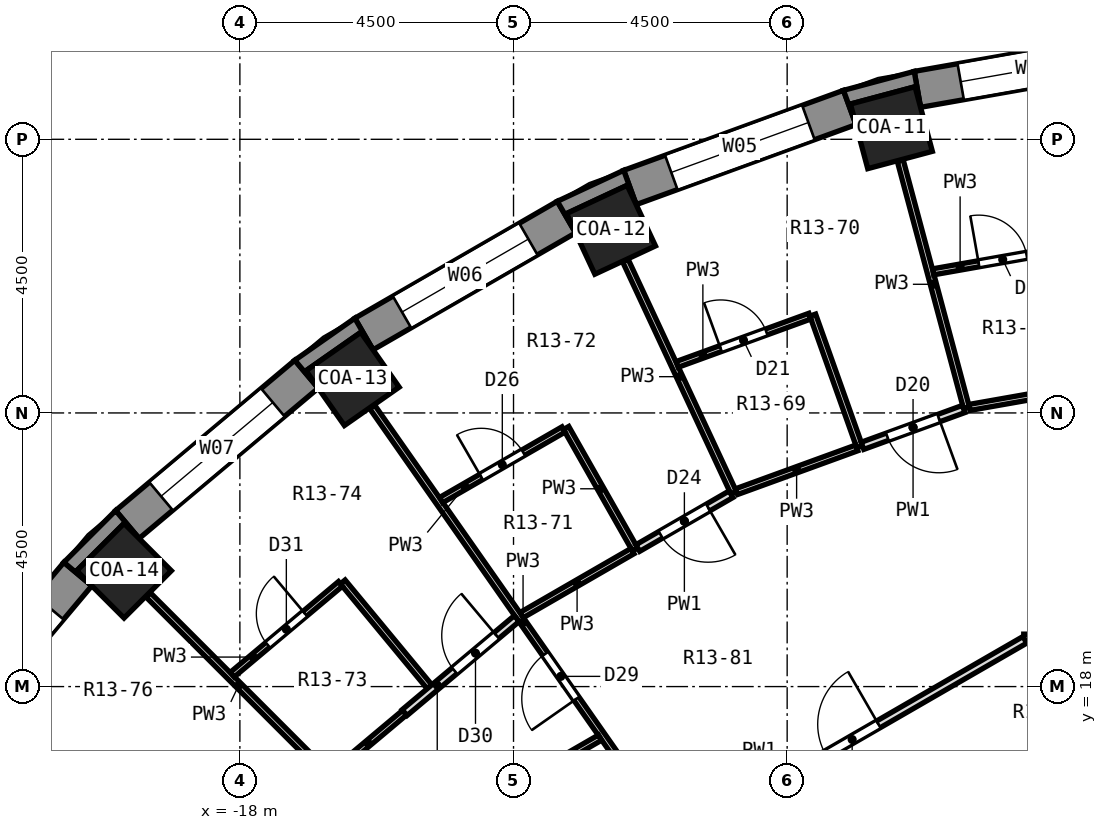
"""IFC4 building model, lengths in metres.
Left out: names, types, materials, properties, quantities, classifications, styles, units other than length and angle.
Written with IfcOpenShell. Run it as: python <this file> out.ifc"""

import sys

from ifc_helpers import new_model, si_unit, direction, frame, frame_2d, origin, origin_2d, place, context, subcontext, project, spatial, polyline, rectangle, outline, extrude, element, fill, save


model = new_model("IFC4")
c1 = context("Model", 3, precision=1e-05, world=origin(), true_north=direction((0.0, 1.0)))
c2 = subcontext(c1, "Body", "Model", "MODEL_VIEW")
j1 = project(units=[si_unit("LENGTHUNIT", "METRE"), si_unit("PLANEANGLEUNIT", "RADIAN")], contexts=[c1])
p1 = place(None, origin())
s1 = spatial("IfcSite", under=j1, at=p1, CompositionType="ELEMENT")
p2 = place(p1, origin())
s2 = spatial("IfcBuilding", under=s1, at=p2, CompositionType="ELEMENT")
p3 = place(p2, frame((0.0, 0.0, 65.9)))
s3 = spatial("IfcBuildingStorey", under=s2, at=p3, CompositionType="ELEMENT", Elevation=65.9)
for number, where, z_axis, x_axis in (
    (1, (-7.286, 27.191, 0.0), (0.0, 0.0, 1.0), (-0.259, 0.966, 0.0)),
    (2, (-11.897, 25.512, 0.0), (0.0, 0.0, 1.0), (-0.423, 0.906, 0.0)),
    (3, (-16.146, 23.059, 0.0), (0.0, 0.0, 1.0), (-0.574, 0.819, 0.0)),
    (4, (-19.905, 19.905, 0.0), (0.0, 0.0, 1.0), (-0.707, 0.707, 0.0)),
):
    element("IfcColumn", number, at=place(p3, frame(where, z_axis=z_axis, x_axis=x_axis)), inside=s3, PredefinedType="COLUMN", context=c2, shape_type="SweptSolid", body=[
        extrude(rectangle(XDim=1.1, YDim=1.1, at=origin_2d()), origin(), (0.0, 0.0, 1.0), 3.3),
    ])
p4 = place(p3, frame((-3.071, 28.489, 0.0), z_axis=(0.0, 0.0, 1.0), x_axis=(-0.984800809218, -0.173687553279, 0.0)))
e5 = element("IfcWall", 5, at=p4, inside=s3, PredefinedType="SOLIDWALL", context=c2, shape_type="SweptSolid", body=[
    extrude(rectangle(XDim=3.846, YDim=0.6, at=frame_2d((1.923, 0.0))), origin(), (0.0, 0.0, 1.0), 2.75),
])
p5 = place(p4, frame((0.723, 0.0, 0.9)))
e6 = element("IfcOpeningElement", 6, at=p5, cuts=e5, PredefinedType="OPENING", context=c2, shape_type="SweptSolid", body=[
    extrude(rectangle(XDim=2.4, YDim=1.8, at=frame_2d((1.2, 0.9))), frame((0.0, 0.312, 0.0), z_axis=(0.0, -1.0, 0.0), x_axis=(1.0, 0.0, 0.0)), (0.0, 0.0, 1.0), 0.624),
])
p6 = place(p3, frame((-7.971, 27.523, 0.0), z_axis=(0.0, 0.0, 1.0), x_axis=(-0.939689588564, -0.342028474173, 0.0)))
e7 = element("IfcWall", 7, at=p6, inside=s3, PredefinedType="SOLIDWALL", context=c2, shape_type="SweptSolid", body=[
    extrude(rectangle(XDim=3.846, YDim=0.6, at=frame_2d((1.923, 0.0))), origin(), (0.0, 0.0, 1.0), 2.75),
])
p7 = place(p6, frame((0.723, 0.0, 0.9)))
e8 = element("IfcOpeningElement", 8, at=p7, cuts=e7, PredefinedType="OPENING", context=c2, shape_type="SweptSolid", body=[
    extrude(rectangle(XDim=2.4, YDim=1.8, at=frame_2d((1.2, 0.9))), frame((0.0, 0.312, 0.0), z_axis=(0.0, -1.0, 0.0), x_axis=(1.0, 0.0, 0.0)), (0.0, 0.0, 1.0), 0.624),
])
p8 = place(p3, frame((-12.63, 25.721, 0.0), z_axis=(0.0, 0.0, 1.0), x_axis=(-0.86603124159, -0.499989888488, 0.0)))
e9 = element("IfcWall", 9, at=p8, inside=s3, PredefinedType="SOLIDWALL", context=c2, shape_type="SweptSolid", body=[
    extrude(rectangle(XDim=3.846, YDim=0.6, at=frame_2d((1.923, 0.0))), origin(), (0.0, 0.0, 1.0), 2.75),
])
p9 = place(p8, frame((0.723, 0.0, 0.9)))
e10 = element("IfcOpeningElement", 10, at=p9, cuts=e9, PredefinedType="OPENING", context=c2, shape_type="SweptSolid", body=[
    extrude(rectangle(XDim=2.4, YDim=1.8, at=frame_2d((1.2, 0.9))), frame((0.0, 0.312, 0.0), z_axis=(0.0, -1.0, 0.0), x_axis=(1.0, 0.0, 0.0)), (0.0, 0.0, 1.0), 0.624),
])
p10 = place(p3, frame((-16.904, 23.137, 0.0), z_axis=(0.0, 0.0, 1.0), x_axis=(-0.766026164483, -0.642809392687, 0.0)))
e11 = element("IfcWall", 11, at=p10, inside=s3, PredefinedType="SOLIDWALL", context=c2, shape_type="SweptSolid", body=[
    extrude(rectangle(XDim=3.846, YDim=0.6, at=frame_2d((1.923, 0.0))), origin(), (0.0, 0.0, 1.0), 2.75),
])
p11 = place(p10, frame((0.723, 0.0, 0.9)))
e12 = element("IfcOpeningElement", 12, at=p11, cuts=e11, PredefinedType="OPENING", context=c2, shape_type="SweptSolid", body=[
    extrude(rectangle(XDim=2.4, YDim=1.8, at=frame_2d((1.2, 0.9))), frame((0.0, 0.312, 0.0), z_axis=(0.0, -1.0, 0.0), x_axis=(1.0, 0.0, 0.0)), (0.0, 0.0, 1.0), 0.624),
])
p12 = place(p3, frame((-20.665, 19.85, 0.0), z_axis=(0.0, 0.0, 1.0), x_axis=(-0.642809392687, -0.766026164483, 0.0)))
e13 = element("IfcWall", 13, at=p12, inside=s3, PredefinedType="SOLIDWALL", context=c2, shape_type="SweptSolid", body=[
    extrude(rectangle(XDim=3.846, YDim=0.6, at=frame_2d((1.923, 0.0))), origin(), (0.0, 0.0, 1.0), 2.75),
])
p13 = place(p12, frame((0.723, 0.0, 0.9)))
e14 = element("IfcOpeningElement", 14, at=p13, cuts=e13, PredefinedType="OPENING", context=c2, shape_type="SweptSolid", body=[
    extrude(rectangle(XDim=2.4, YDim=1.8, at=frame_2d((1.2, 0.9))), frame((0.0, 0.312, 0.0), z_axis=(0.0, -1.0, 0.0), x_axis=(1.0, 0.0, 0.0)), (0.0, 0.0, 1.0), 0.624),
])
p14 = place(p3, origin())
e15 = element("IfcWall", 15, at=p14, inside=s3, PredefinedType="SOLIDWALL", context=c2, shape_type="SweptSolid", body=[
    extrude(outline(polyline([(-6.91, 28.117), (-8.074, 27.805), (-7.869, 27.241), (-7.959, 27.58), (-6.897, 27.865), (-6.806, 27.526), (-6.91, 28.117)])), origin(), (0.0, 0.0, 1.0), 2.75),
])
p15 = place(p3, origin())
e16 = element("IfcWall", 16, at=p15, inside=s3, PredefinedType="SOLIDWALL", context=c2, shape_type="SweptSolid", body=[
    extrude(outline(polyline([(-12.78, 25.981), (-12.479, 25.461), (-12.628, 25.779), (-11.631, 26.243), (-11.483, 25.926), (-11.688, 26.49), (-12.78, 25.981)])), origin(), (0.0, 0.0, 1.0), 2.75),
])
p16 = place(p3, origin())
e17 = element("IfcWall", 17, at=p16, inside=s3, PredefinedType="SOLIDWALL", context=c2, shape_type="SweptSolid", body=[
    extrude(outline(polyline([(-16.11, 24.058), (-17.097, 23.367), (-16.711, 22.907), (-16.912, 23.194), (-16.011, 23.825), (-15.81, 23.538), (-16.11, 24.058)])), origin(), (0.0, 0.0, 1.0), 2.75),
])
p17 = place(p3, origin())
e18 = element("IfcWall", 18, at=p17, inside=s3, PredefinedType="SOLIDWALL", context=c2, shape_type="SweptSolid", body=[
    extrude(outline(polyline([(-20.895, 20.043), (-20.435, 19.657), (-20.683, 19.905), (-19.905, 20.683), (-19.657, 20.435), (-20.043, 20.895), (-20.895, 20.043)])), origin(), (0.0, 0.0, 1.0), 2.75),
])
p18 = place(p3, frame((-7.14, 26.65, 0.0), z_axis=(0.0, 0.0, 1.0), x_axis=(0.258611481132, -0.965981418986, 0.0)))
e19 = element("IfcWall", 19, at=p18, inside=s3, PredefinedType="PARTITIONING", context=c2, shape_type="SweptSolid", body=[
    extrude(rectangle(XDim=4.211, YDim=0.1, at=frame_2d((2.106, 0.0))), origin(), (0.0, 0.0, 1.0), 2.75),
])
p19 = place(p3, frame((-8.579, 24.109, 0.0), z_axis=(0.0, 0.0, 1.0), x_axis=(0.335206501266, -0.942144681835, 0.0)))
e20 = element("IfcWall", 20, at=p19, inside=s3, PredefinedType="PARTITIONING", context=c2, shape_type="SweptSolid", body=[
    extrude(rectangle(XDim=2.3, YDim=0.1, at=frame_2d((1.15, 0.0))), origin(), (0.0, 0.0, 1.0), 2.75),
])
p20 = place(p3, frame((-11.66, 25.005, 0.0), z_axis=(0.0, 0.0, 1.0), x_axis=(0.422631582156, -0.906301575506, 0.0)))
e21 = element("IfcWall", 21, at=p20, inside=s3, PredefinedType="PARTITIONING", context=c2, shape_type="SweptSolid", body=[
    extrude(rectangle(XDim=4.212, YDim=0.1, at=frame_2d((2.106, 0.0))), origin(), (0.0, 0.0, 1.0), 2.75),
])
p21 = place(p3, frame((-12.635, 22.253, 0.0), z_axis=(0.0, 0.0, 1.0), x_axis=(0.493564284385, -0.869709317634, 0.0)))
e22 = element("IfcWall", 22, at=p21, inside=s3, PredefinedType="PARTITIONING", context=c2, shape_type="SweptSolid", body=[
    extrude(rectangle(XDim=2.3, YDim=0.1, at=frame_2d((1.15, 0.0))), origin(), (0.0, 0.0, 1.0), 2.75),
])
p22 = place(p3, frame((-15.825, 22.601, 0.0), z_axis=(0.0, 0.0, 1.0), x_axis=(0.57339608395, -0.819278298816, 0.0)))
e23 = element("IfcWall", 23, at=p22, inside=s3, PredefinedType="PARTITIONING", context=c2, shape_type="SweptSolid", body=[
    extrude(rectangle(XDim=8.655, YDim=0.1, at=frame_2d((4.328, 0.0))), origin(), (0.0, 0.0, 1.0), 2.75),
])
p23 = place(p22, frame((7.264, 0.0, 0.0)))
e24 = element("IfcOpeningElement", 24, at=p23, cuts=e23, PredefinedType="OPENING", context=c2, shape_type="SweptSolid", body=[
    extrude(rectangle(XDim=0.8, YDim=2.1, at=frame_2d((0.4, 1.05))), frame((0.0, 0.062, 0.0), z_axis=(0.0, -1.0, 0.0), x_axis=(1.0, 0.0, 0.0)), (0.0, 0.0, 1.0), 0.124),
])
p24 = place(p22, frame((4.96, 0.0, 0.0)))
e25 = element("IfcOpeningElement", 25, at=p24, cuts=e23, PredefinedType="OPENING", context=c2, shape_type="SweptSolid", body=[
    extrude(rectangle(XDim=0.9, YDim=2.1, at=frame_2d((0.45, 1.05))), frame((0.0, 0.062, 0.0), z_axis=(0.0, -1.0, 0.0), x_axis=(1.0, 0.0, 0.0)), (0.0, 0.0, 1.0), 0.124),
])
p25 = place(p3, frame((-16.308, 19.721, 0.0), z_axis=(0.0, 0.0, 1.0), x_axis=(0.637464982276, -0.770479328971, 0.0)))
e26 = element("IfcWall", 26, at=p25, inside=s3, PredefinedType="PARTITIONING", context=c2, shape_type="SweptSolid", body=[
    extrude(rectangle(XDim=2.237, YDim=0.1, at=frame_2d((1.119, 0.0))), origin(), (0.0, 0.0, 1.0), 2.75),
])
p26 = place(p3, frame((-19.509, 19.509, 0.0), z_axis=(0.0, 0.0, 1.0), x_axis=(0.707106781187, -0.707106781187, 0.0)))
e27 = element("IfcWall", 27, at=p26, inside=s3, PredefinedType="PARTITIONING", context=c2, shape_type="SweptSolid", body=[
    extrude(rectangle(XDim=4.212, YDim=0.1, at=frame_2d((2.106, 0.0))), origin(), (0.0, 0.0, 1.0), 2.75),
])
p27 = place(p3, frame((-5.109, 18.8, 0.0), z_axis=(0.0, 0.0, 1.0), x_axis=(1.0, 0.0, 0.0)))
e28 = element("IfcWall", 28, at=p27, inside=s3, PredefinedType="PARTITIONING", context=c2, shape_type="SweptSolid", body=[
    extrude(rectangle(XDim=10.084, YDim=0.125, at=frame_2d((5.042, 0.0))), origin(), (0.0, 0.0, 1.0), 2.75),
])
p28 = place(p3, frame((-6.002, 22.591, 0.0), z_axis=(0.0, 0.0, 1.0), x_axis=(0.984798730273, 0.173699340392, 0.0)))
e29 = element("IfcWall", 29, at=p28, inside=s3, PredefinedType="PARTITIONING", context=c2, shape_type="SweptSolid", body=[
    extrude(rectangle(XDim=2.105, YDim=0.1, at=frame_2d((1.053, 0.0))), origin(), (0.0, 0.0, 1.0), 2.75),
])
p29 = place(p3, frame((-6.599, 24.821, 0.0), z_axis=(0.0, 0.0, 1.0), x_axis=(0.984793079882, 0.173731372577, 0.0)))
e30 = element("IfcWall", 30, at=p29, inside=s3, PredefinedType="PARTITIONING", context=c2, shape_type="SweptSolid", body=[
    extrude(rectangle(XDim=2.323, YDim=0.1, at=frame_2d((1.162, 0.0))), origin(), (0.0, 0.0, 1.0), 2.75),
])
p30 = place(p29, frame((0.761, 0.0, 0.0)))
e31 = element("IfcOpeningElement", 31, at=p30, cuts=e30, PredefinedType="OPENING", context=c2, shape_type="SweptSolid", body=[
    extrude(rectangle(XDim=0.8, YDim=2.1, at=frame_2d((0.4, 1.05))), frame((0.0, 0.062, 0.0), z_axis=(0.0, -1.0, 0.0), x_axis=(1.0, 0.0, 0.0)), (0.0, 0.0, 1.0), 0.124),
])
p31 = place(p3, frame((-9.833, 21.205, 0.0), z_axis=(0.0, 0.0, 1.0), x_axis=(0.939725675468, 0.341929312674, 0.0)))
e32 = element("IfcWall", 32, at=p31, inside=s3, PredefinedType="PARTITIONING", context=c2, shape_type="SweptSolid", body=[
    extrude(rectangle(XDim=2.105, YDim=0.1, at=frame_2d((1.052, 0.0))), origin(), (0.0, 0.0, 1.0), 2.75),
])
p32 = place(p3, frame((-7.761, 21.959, 0.0), z_axis=(0.0, 0.0, 1.0), x_axis=(0.939620127684, 0.342219250849, 0.0)))
e33 = element("IfcWall", 33, at=p32, inside=s3, PredefinedType="PARTITIONING", context=c2, shape_type="SweptSolid", body=[
    extrude(rectangle(XDim=1.77, YDim=0.125, at=frame_2d((0.885, 0.0))), origin(), (0.0, 0.0, 1.0), 2.75),
])
p33 = place(p32, frame((0.435, 0.0, 0.0)))
e34 = element("IfcOpeningElement", 34, at=p33, cuts=e33, PredefinedType="OPENING", context=c2, shape_type="SweptSolid", body=[
    extrude(rectangle(XDim=0.9, YDim=2.1, at=frame_2d((0.45, 1.05))), frame((0.0, 0.074, 0.0), z_axis=(0.0, -1.0, 0.0), x_axis=(1.0, 0.0, 0.0)), (0.0, 0.0, 1.0), 0.149),
])
p34 = place(p3, frame((-10.809, 23.298, 0.0), z_axis=(0.0, 0.0, 1.0), x_axis=(0.939802630001, 0.341717744115, 0.0)))
e35 = element("IfcWall", 35, at=p34, inside=s3, PredefinedType="PARTITIONING", context=c2, shape_type="SweptSolid", body=[
    extrude(rectangle(XDim=2.323, YDim=0.1, at=frame_2d((1.161, 0.0))), origin(), (0.0, 0.0, 1.0), 2.75),
])
p35 = place(p34, frame((0.761, 0.0, 0.0)))
e36 = element("IfcOpeningElement", 36, at=p35, cuts=e35, PredefinedType="OPENING", context=c2, shape_type="SweptSolid", body=[
    extrude(rectangle(XDim=0.8, YDim=2.1, at=frame_2d((0.4, 1.05))), frame((0.0, 0.062, 0.0), z_axis=(0.0, -1.0, 0.0), x_axis=(1.0, 0.0, 0.0)), (0.0, 0.0, 1.0), 0.124),
])
p36 = place(p3, frame((-13.825, 13.727, 0.0), z_axis=(0.0, 0.0, 1.0), x_axis=(0.866059817553, 0.499940388867, 0.0)))
e37 = element("IfcWall", 37, at=p36, inside=s3, PredefinedType="PARTITIONING", context=c2, shape_type="SweptSolid", body=[
    extrude(rectangle(XDim=10.085, YDim=0.125, at=frame_2d((5.042, 0.0))), origin(), (0.0, 0.0, 1.0), 2.75),
])
p37 = place(p36, frame((6.306, 0.0, 0.0)))
e38 = element("IfcOpeningElement", 38, at=p37, cuts=e37, PredefinedType="OPENING", context=c2, shape_type="SweptSolid", body=[
    extrude(rectangle(XDim=1.0, YDim=2.1, at=frame_2d((0.5, 1.05))), frame((0.0, 0.074, 0.0), z_axis=(0.0, -1.0, 0.0), x_axis=(1.0, 0.0, 0.0)), (0.0, 0.0, 1.0), 0.149),
])
p38 = place(p3, frame((-14.119, 15.982, 0.0), z_axis=(0.0, 0.0, 1.0), x_axis=(0.865945816379, 0.5001378241, 0.0)))
e39 = element("IfcWall", 39, at=p38, inside=s3, PredefinedType="PARTITIONING", context=c2, shape_type="SweptSolid", body=[
    extrude(rectangle(XDim=2.357, YDim=0.1, at=frame_2d((1.179, 0.0))), origin(), (0.0, 0.0, 1.0), 2.75),
])
p39 = place(p3, frame((-13.366, 19.176, 0.0), z_axis=(0.0, 0.0, 1.0), x_axis=(0.866071606143, 0.499919966627, 0.0)))
e40 = element("IfcWall", 40, at=p39, inside=s3, PredefinedType="PARTITIONING", context=c2, shape_type="SweptSolid", body=[
    extrude(rectangle(XDim=2.104, YDim=0.1, at=frame_2d((1.052, 0.0))), origin(), (0.0, 0.0, 1.0), 2.75),
])
p40 = place(p3, frame((-11.457, 20.278, 0.0), z_axis=(0.0, 0.0, 1.0), x_axis=(0.86610522661, 0.499861717316, 0.0)))
e41 = element("IfcWall", 41, at=p40, inside=s3, PredefinedType="PARTITIONING", context=c2, shape_type="SweptSolid", body=[
    extrude(rectangle(XDim=1.771, YDim=0.125, at=frame_2d((0.885, 0.0))), origin(), (0.0, 0.0, 1.0), 2.75),
])
p41 = place(p40, frame((0.435, 0.0, 0.0)))
e42 = element("IfcOpeningElement", 42, at=p41, cuts=e41, PredefinedType="OPENING", context=c2, shape_type="SweptSolid", body=[
    extrude(rectangle(XDim=0.9, YDim=2.1, at=frame_2d((0.45, 1.05))), frame((0.0, 0.074, 0.0), z_axis=(0.0, -1.0, 0.0), x_axis=(1.0, 0.0, 0.0)), (0.0, 0.0, 1.0), 0.149),
])
p42 = place(p3, frame((-14.691, 21.067, 0.0), z_axis=(0.0, 0.0, 1.0), x_axis=(0.866166342301, 0.499755807835, 0.0)))
e43 = element("IfcWall", 43, at=p42, inside=s3, PredefinedType="PARTITIONING", context=c2, shape_type="SweptSolid", body=[
    extrude(rectangle(XDim=2.323, YDim=0.1, at=frame_2d((1.162, 0.0))), origin(), (0.0, 0.0, 1.0), 2.75),
])
p43 = place(p42, frame((0.762, 0.0, 0.0)))
e44 = element("IfcOpeningElement", 44, at=p43, cuts=e43, PredefinedType="OPENING", context=c2, shape_type="SweptSolid", body=[
    extrude(rectangle(XDim=0.8, YDim=2.1, at=frame_2d((0.4, 1.05))), frame((0.0, 0.062, 0.0), z_axis=(0.0, -1.0, 0.0), x_axis=(1.0, 0.0, 0.0)), (0.0, 0.0, 1.0), 0.124),
])
p44 = place(p3, frame((-16.493, 16.563, 0.0), z_axis=(0.0, 0.0, 1.0), x_axis=(0.765882590802, 0.642980448463, 0.0)))
e45 = element("IfcWall", 45, at=p44, inside=s3, PredefinedType="PARTITIONING", context=c2, shape_type="SweptSolid", body=[
    extrude(rectangle(XDim=1.569, YDim=0.1, at=frame_2d((0.785, 0.0))), origin(), (0.0, 0.0, 1.0), 2.75),
])
p45 = place(p3, frame((-15.291, 17.572, 0.0), z_axis=(0.0, 0.0, 1.0), x_axis=(0.766188320354, 0.642616104492, 0.0)))
e46 = element("IfcWall", 46, at=p45, inside=s3, PredefinedType="PARTITIONING", context=c2, shape_type="SweptSolid", body=[
    extrude(rectangle(XDim=2.406, YDim=0.125, at=frame_2d((1.203, 0.0))), origin(), (0.0, 0.0, 1.0), 2.75),
])
p46 = place(p45, frame((1.071, 0.0, 0.0)))
e47 = element("IfcOpeningElement", 47, at=p46, cuts=e46, PredefinedType="OPENING", context=c2, shape_type="SweptSolid", body=[
    extrude(rectangle(XDim=0.9, YDim=2.1, at=frame_2d((0.45, 1.05))), frame((0.0, 0.074, 0.0), z_axis=(0.0, -1.0, 0.0), x_axis=(1.0, 0.0, 0.0)), (0.0, 0.0, 1.0), 0.149),
])
p47 = place(p3, frame((-18.126, 18.196, 0.0), z_axis=(0.0, 0.0, 1.0), x_axis=(0.766106399864, 0.642713765286, 0.0)))
e48 = element("IfcWall", 48, at=p47, inside=s3, PredefinedType="PARTITIONING", context=c2, shape_type="SweptSolid", body=[
    extrude(rectangle(XDim=2.323, YDim=0.1, at=frame_2d((1.161, 0.0))), origin(), (0.0, 0.0, 1.0), 2.75),
])
p48 = place(p47, frame((0.761, 0.0, 0.0)))
e49 = element("IfcOpeningElement", 49, at=p48, cuts=e48, PredefinedType="OPENING", context=c2, shape_type="SweptSolid", body=[
    extrude(rectangle(XDim=0.8, YDim=2.1, at=frame_2d((0.4, 1.05))), frame((0.0, 0.062, 0.0), z_axis=(0.0, -1.0, 0.0), x_axis=(1.0, 0.0, 0.0)), (0.0, 0.0, 1.0), 0.124),
])
p49 = place(p5, origin())
e50 = element("IfcWindow", 50, at=p49, inside=s3, PartitioningType="SINGLE_PANEL", PredefinedType="WINDOW", context=c2, shape_type="SweptSolid", body=[
    extrude(rectangle(XDim=2.4, YDim=1.8, at=frame_2d((1.2, 0.9))), frame((0.0, 0.18, 0.0), z_axis=(0.0, -1.0, 0.0), x_axis=(1.0, 0.0, 0.0)), (0.0, 0.0, 1.0), 0.06),
])
fill(e6, e50)
p50 = place(p7, origin())
e51 = element("IfcWindow", 51, at=p50, inside=s3, PartitioningType="SINGLE_PANEL", PredefinedType="WINDOW", context=c2, shape_type="SweptSolid", body=[
    extrude(rectangle(XDim=2.4, YDim=1.8, at=frame_2d((1.2, 0.9))), frame((0.0, 0.18, 0.0), z_axis=(0.0, -1.0, 0.0), x_axis=(1.0, 0.0, 0.0)), (0.0, 0.0, 1.0), 0.06),
])
fill(e8, e51)
p51 = place(p9, origin())
e52 = element("IfcWindow", 52, at=p51, inside=s3, PartitioningType="SINGLE_PANEL", PredefinedType="WINDOW", context=c2, shape_type="SweptSolid", body=[
    extrude(rectangle(XDim=2.4, YDim=1.8, at=frame_2d((1.2, 0.9))), frame((0.0, 0.18, 0.0), z_axis=(0.0, -1.0, 0.0), x_axis=(1.0, 0.0, 0.0)), (0.0, 0.0, 1.0), 0.06),
])
fill(e10, e52)
p52 = place(p11, origin())
e53 = element("IfcWindow", 53, at=p52, inside=s3, PartitioningType="SINGLE_PANEL", PredefinedType="WINDOW", context=c2, shape_type="SweptSolid", body=[
    extrude(rectangle(XDim=2.4, YDim=1.8, at=frame_2d((1.2, 0.9))), frame((0.0, 0.18, 0.0), z_axis=(0.0, -1.0, 0.0), x_axis=(1.0, 0.0, 0.0)), (0.0, 0.0, 1.0), 0.06),
])
fill(e12, e53)
p53 = place(p13, origin())
e54 = element("IfcWindow", 54, at=p53, inside=s3, PartitioningType="SINGLE_PANEL", PredefinedType="WINDOW", context=c2, shape_type="SweptSolid", body=[
    extrude(rectangle(XDim=2.4, YDim=1.8, at=frame_2d((1.2, 0.9))), frame((0.0, 0.18, 0.0), z_axis=(0.0, -1.0, 0.0), x_axis=(1.0, 0.0, 0.0)), (0.0, 0.0, 1.0), 0.06),
])
fill(e14, e54)
p54 = place(p30, origin())
e55 = element("IfcDoor", 55, at=p54, inside=s3, OperationType="SINGLE_SWING_LEFT", PredefinedType="DOOR", context=c2, shape_type="SweptSolid", body=[
    extrude(rectangle(XDim=0.8, YDim=2.1, at=frame_2d((0.4, 1.05))), frame((0.0, 0.025, 0.0), z_axis=(0.0, -1.0, 0.0), x_axis=(1.0, 0.0, 0.0)), (0.0, 0.0, 1.0), 0.05),
])
fill(e31, e55)
p55 = place(p33, frame((0.9, 0.0, 0.0), z_axis=(0.0, 0.0, 1.0), x_axis=(-1.0, 0.0, 0.0)))
e56 = element("IfcDoor", 56, at=p55, inside=s3, OperationType="SINGLE_SWING_LEFT", PredefinedType="DOOR", context=c2, shape_type="SweptSolid", body=[
    extrude(rectangle(XDim=0.9, YDim=2.1, at=frame_2d((0.45, 1.05))), frame((0.0, 0.025, 0.0), z_axis=(0.0, -1.0, 0.0), x_axis=(1.0, 0.0, 0.0)), (0.0, 0.0, 1.0), 0.05),
])
fill(e34, e56)
p56 = place(p35, origin())
e57 = element("IfcDoor", 57, at=p56, inside=s3, OperationType="SINGLE_SWING_LEFT", PredefinedType="DOOR", context=c2, shape_type="SweptSolid", body=[
    extrude(rectangle(XDim=0.8, YDim=2.1, at=frame_2d((0.4, 1.05))), frame((0.0, 0.025, 0.0), z_axis=(0.0, -1.0, 0.0), x_axis=(1.0, 0.0, 0.0)), (0.0, 0.0, 1.0), 0.05),
])
fill(e36, e57)
p57 = place(p37, origin())
e58 = element("IfcDoor", 58, at=p57, inside=s3, OperationType="SINGLE_SWING_RIGHT", PredefinedType="DOOR", context=c2, shape_type="SweptSolid", body=[
    extrude(rectangle(XDim=1.0, YDim=2.1, at=frame_2d((0.5, 1.05))), frame((0.0, 0.025, 0.0), z_axis=(0.0, -1.0, 0.0), x_axis=(1.0, 0.0, 0.0)), (0.0, 0.0, 1.0), 0.05),
])
fill(e38, e58)
p58 = place(p41, frame((0.9, 0.0, 0.0), z_axis=(0.0, 0.0, 1.0), x_axis=(-1.0, 0.0, 0.0)))
e59 = element("IfcDoor", 59, at=p58, inside=s3, OperationType="SINGLE_SWING_LEFT", PredefinedType="DOOR", context=c2, shape_type="SweptSolid", body=[
    extrude(rectangle(XDim=0.9, YDim=2.1, at=frame_2d((0.45, 1.05))), frame((0.0, 0.025, 0.0), z_axis=(0.0, -1.0, 0.0), x_axis=(1.0, 0.0, 0.0)), (0.0, 0.0, 1.0), 0.05),
])
fill(e42, e59)
p59 = place(p43, origin())
e60 = element("IfcDoor", 60, at=p59, inside=s3, OperationType="SINGLE_SWING_LEFT", PredefinedType="DOOR", context=c2, shape_type="SweptSolid", body=[
    extrude(rectangle(XDim=0.8, YDim=2.1, at=frame_2d((0.4, 1.05))), frame((0.0, 0.025, 0.0), z_axis=(0.0, -1.0, 0.0), x_axis=(1.0, 0.0, 0.0)), (0.0, 0.0, 1.0), 0.05),
])
fill(e44, e60)
p60 = place(p24, frame((0.9, 0.0, 0.0), z_axis=(0.0, 0.0, 1.0), x_axis=(-1.0, 0.0, 0.0)))
e61 = element("IfcDoor", 61, at=p60, inside=s3, OperationType="SINGLE_SWING_LEFT", PredefinedType="DOOR", context=c2, shape_type="SweptSolid", body=[
    extrude(rectangle(XDim=0.9, YDim=2.1, at=frame_2d((0.45, 1.05))), frame((0.0, 0.025, 0.0), z_axis=(0.0, -1.0, 0.0), x_axis=(1.0, 0.0, 0.0)), (0.0, 0.0, 1.0), 0.05),
])
fill(e25, e61)
p61 = place(p46, origin())
e62 = element("IfcDoor", 62, at=p61, inside=s3, OperationType="SINGLE_SWING_RIGHT", PredefinedType="DOOR", context=c2, shape_type="SweptSolid", body=[
    extrude(rectangle(XDim=0.9, YDim=2.1, at=frame_2d((0.45, 1.05))), frame((0.0, 0.025, 0.0), z_axis=(0.0, -1.0, 0.0), x_axis=(1.0, 0.0, 0.0)), (0.0, 0.0, 1.0), 0.05),
])
fill(e47, e62)
p62 = place(p48, origin())
e63 = element("IfcDoor", 63, at=p62, inside=s3, OperationType="SINGLE_SWING_RIGHT", PredefinedType="DOOR", context=c2, shape_type="SweptSolid", body=[
    extrude(rectangle(XDim=0.8, YDim=2.1, at=frame_2d((0.4, 1.05))), frame((0.0, 0.025, 0.0), z_axis=(0.0, -1.0, 0.0), x_axis=(1.0, 0.0, 0.0)), (0.0, 0.0, 1.0), 0.05),
])
fill(e49, e63)
save(model, sys.argv[1])
